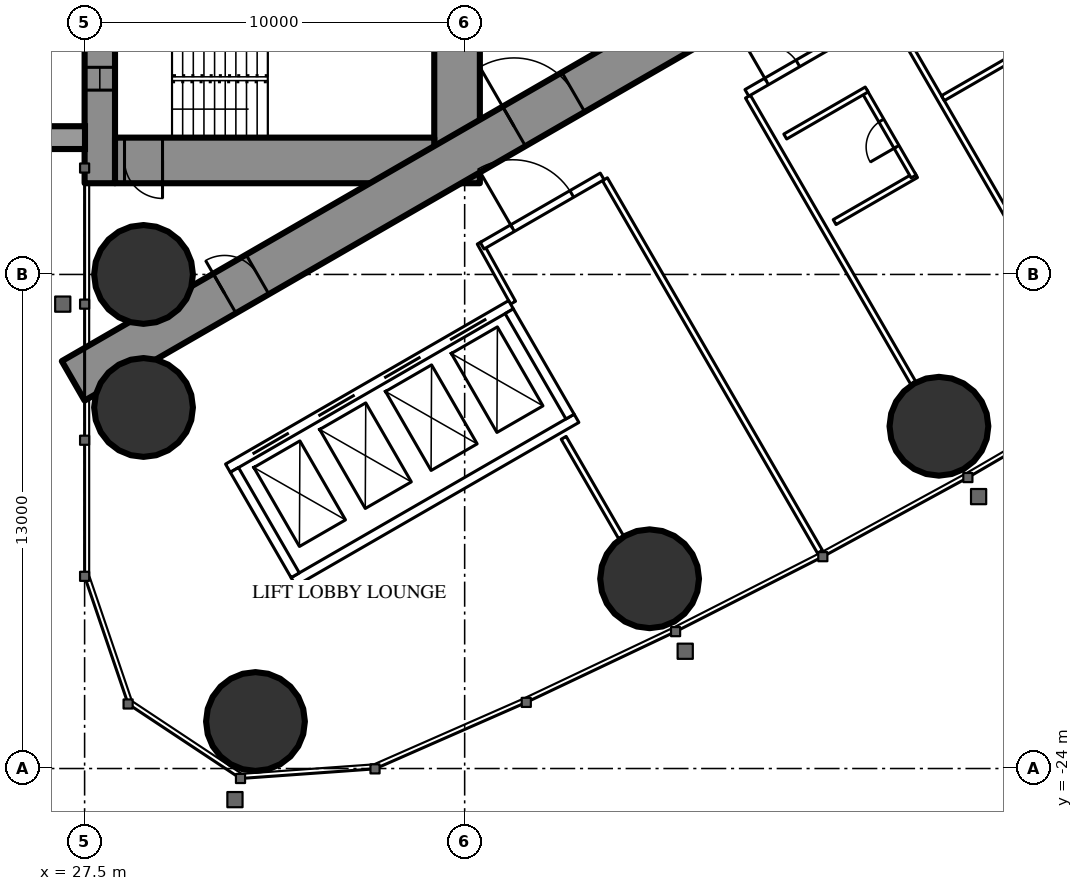
"""IFC4 building model, lengths in metres.
Left out: names, types, materials, properties, quantities, classifications, styles, units other than length and angle.
Written with IfcOpenShell. Run it as: python <this file> out.ifc"""

import sys

from ifc_helpers import new_model, si_unit, direction, frame, frame_2d, origin, origin_2d, place, context, subcontext, project, spatial, rectangle, hollow_circle, extrude, element, fill, save


model = new_model("IFC4")
c1 = context("Model", 3, precision=1e-05, world=origin(), true_north=direction((0.0, 1.0)))
c2 = subcontext(c1, "Body", "Model", "MODEL_VIEW")
j1 = project(units=[si_unit("LENGTHUNIT", "METRE"), si_unit("PLANEANGLEUNIT", "RADIAN")], contexts=[c1])
p1 = place(None, origin())
s1 = spatial("IfcSite", under=j1, at=p1, CompositionType="ELEMENT")
p2 = place(p1, origin())
s2 = spatial("IfcBuilding", under=s1, at=p2, CompositionType="ELEMENT")
p3 = place(p2, frame((0.0, 0.0, 122.1)))
s3 = spatial("IfcBuildingStorey", under=s2, at=p3, CompositionType="ELEMENT", Elevation=122.1)
for number, where, z_axis, x_axis in (
    (1, (31.996, -22.763, 0.0), (0.0, 0.0, 1.0), (1.0, 0.0, 0.0)),
    (2, (29.05, -11.0, 0.0), (0.0, 0.0, 1.0), (1.0, 0.0, 0.0)),
    (3, (29.05, -14.5, 0.0), (0.0, 0.0, 1.0), (1.0, 0.0, 0.0)),
    (4, (42.366, -19.007, 0.0), (0.0, 0.0, 1.0), (1.0, 0.0, 0.0)),
    (5, (49.979, -14.994, 0.0), (0.0, 0.0, 1.0), (1.0, 0.0, 0.0)),
):
    element("IfcColumn", number, at=place(p3, frame(where, z_axis=z_axis, x_axis=x_axis)), inside=s3, PredefinedType="COLUMN", context=c2, shape_type="SweptSolid", body=[
        extrude(hollow_circle(Radius=1.3, WallThickness=0.1, at=origin_2d()), origin(), (0.0, 0.0, 1.0), 3.5),
    ])
p4 = place(p3, frame((27.9, -8.6, 0.0), z_axis=(0.0, 0.0, 1.0), x_axis=(0.0, 1.0, 0.0)))
e6 = element("IfcWall", 6, at=p4, inside=s3, PredefinedType="SHEAR", context=c2, shape_type="SweptSolid", body=[
    extrude(rectangle(XDim=17.2, YDim=0.8, at=frame_2d((8.6, 0.0))), origin(), (0.0, 0.0, 1.0), 3.5),
])
p5 = place(p4, frame((2.45, 0.0, 0.6)))
e7 = element("IfcOpeningElement", 7, at=p5, cuts=e6, PredefinedType="OPENING", context=c2, shape_type="SweptSolid", body=[
    extrude(rectangle(XDim=0.6, YDim=2.1, at=frame_2d((0.3, 1.05))), frame((0.0, 0.41, 0.0), z_axis=(0.0, -1.0, 0.0), x_axis=(1.0, 0.0, 0.0)), (0.0, 0.0, 1.0), 0.82),
])
p6 = place(p4, frame((14.15, 0.0, 0.6)))
e8 = element("IfcOpeningElement", 8, at=p6, cuts=e6, PredefinedType="OPENING", context=c2, shape_type="SweptSolid", body=[
    extrude(rectangle(XDim=0.6, YDim=2.1, at=frame_2d((0.3, 1.05))), frame((0.0, 0.41, 0.0), z_axis=(0.0, -1.0, 0.0), x_axis=(1.0, 0.0, 0.0)), (0.0, 0.0, 1.0), 0.82),
])
p7 = place(p3, frame((37.3, -8.6, 0.0), z_axis=(0.0, 0.0, 1.0), x_axis=(0.0, 1.0, 0.0)))
e9 = element("IfcWall", 9, at=p7, inside=s3, PredefinedType="SHEAR", context=c2, shape_type="SweptSolid", body=[
    extrude(rectangle(XDim=17.2, YDim=1.2, at=frame_2d((8.6, 0.0))), origin(), (0.0, 0.0, 1.0), 3.5),
])
p8 = place(p7, frame((7.7, 0.0, 0.0)))
e10 = element("IfcOpeningElement", 10, at=p8, cuts=e9, PredefinedType="OPENING", context=c2, shape_type="SweptSolid", body=[
    extrude(rectangle(XDim=1.8, YDim=2.2, at=frame_2d((0.9, 1.1))), frame((0.0, 0.61, 0.0), z_axis=(0.0, -1.0, 0.0), x_axis=(1.0, 0.0, 0.0)), (0.0, 0.0, 1.0), 1.22),
])
p9 = place(p3, frame((28.3, -8.0, 0.0), z_axis=(0.0, 0.0, 1.0), x_axis=(1.0, 0.0, 0.0)))
e11 = element("IfcWall", 11, at=p9, inside=s3, PredefinedType="SHEAR", context=c2, shape_type="SweptSolid", body=[
    extrude(rectangle(XDim=8.4, YDim=1.2, at=frame_2d((4.2, 0.0))), origin(), (0.0, 0.0, 1.0), 3.5),
])
p10 = place(p9, frame((0.25, 0.0, 0.0)))
e12 = element("IfcOpeningElement", 12, at=p10, cuts=e11, PredefinedType="OPENING", context=c2, shape_type="SweptSolid", body=[
    extrude(rectangle(XDim=1.0, YDim=2.2, at=frame_2d((0.5, 1.1))), frame((0.0, 0.61, 0.0), z_axis=(0.0, -1.0, 0.0), x_axis=(1.0, 0.0, 0.0)), (0.0, 0.0, 1.0), 1.22),
])
p11 = place(p3, frame((27.2, -13.8, 0.0), z_axis=(0.0, 0.0, 1.0), x_axis=(0.866027159892, 0.499996958321, 0.0)))
e13 = element("IfcWall", 13, at=p11, inside=s3, PredefinedType="SHEAR", context=c2, shape_type="SweptSolid", body=[
    extrude(rectangle(XDim=27.947, YDim=1.2, at=frame_2d((13.973, 0.0))), origin(), (0.0, 0.0, 1.0), 3.5),
])
p12 = place(p11, frame((4.6, 0.0, 0.0)))
e14 = element("IfcOpeningElement", 14, at=p12, cuts=e13, PredefinedType="OPENING", context=c2, shape_type="SweptSolid", body=[
    extrude(rectangle(XDim=1.0, YDim=2.2, at=frame_2d((0.5, 1.1))), frame((0.0, 0.61, 0.0), z_axis=(0.0, -1.0, 0.0), x_axis=(1.0, 0.0, 0.0)), (0.0, 0.0, 1.0), 1.22),
])
p13 = place(p11, frame((13.395, 0.0, 0.0)))
e15 = element("IfcOpeningElement", 15, at=p13, cuts=e13, PredefinedType="OPENING", context=c2, shape_type="SweptSolid", body=[
    extrude(rectangle(XDim=1.8, YDim=2.2, at=frame_2d((0.9, 1.1))), frame((0.0, 0.61, 0.0), z_axis=(0.0, -1.0, 0.0), x_axis=(1.0, 0.0, 0.0)), (0.0, 0.0, 1.0), 1.22),
])
p14 = place(p3, frame((41.19, -8.494, 0.0), z_axis=(0.0, 0.0, 1.0), x_axis=(0.49999258054, -0.866029687369, 0.0)))
e16 = element("IfcWall", 16, at=p14, inside=s3, PredefinedType="PARTITIONING", context=c2, shape_type="SweptSolid", body=[
    extrude(rectangle(XDim=11.318, YDim=0.15, at=frame_2d((5.659, 0.0))), origin(), (0.0, 0.0, 1.0), 3.25),
])
p15 = place(p3, frame((44.954, -6.321, 0.0), z_axis=(0.0, 0.0, 1.0), x_axis=(0.500018676722, -0.866014620505, 0.0)))
e17 = element("IfcWall", 17, at=p15, inside=s3, PredefinedType="PARTITIONING", context=c2, shape_type="SweptSolid", body=[
    extrude(rectangle(XDim=8.704, YDim=0.15, at=frame_2d((4.352, 0.0))), origin(), (0.0, 0.0, 1.0), 2.2),
])
p16 = place(p3, frame((48.719, -4.147, 0.0), z_axis=(0.0, 0.0, 1.0), x_axis=(0.499990498062, -0.866030889661, 0.0)))
e18 = element("IfcWall", 18, at=p16, inside=s3, PredefinedType="PARTITIONING", context=c2, shape_type="SweptSolid", body=[
    extrude(rectangle(XDim=11.406, YDim=0.15, at=frame_2d((5.703, 0.0))), origin(), (0.0, 0.0, 1.0), 3.25),
])
p17 = place(p3, frame((40.105, -15.299, 0.0), z_axis=(0.0, 0.0, 1.0), x_axis=(0.499978822259, -0.866037630414, 0.0)))
e19 = element("IfcWall", 19, at=p17, inside=s3, PredefinedType="PARTITIONING", context=c2, shape_type="SweptSolid", body=[
    extrude(rectangle(XDim=3.023, YDim=0.15, at=frame_2d((1.511, 0.0))), origin(), (0.0, 0.0, 1.0), 3.25),
])
p18 = place(p3, frame((38.773, -11.742, 0.0), z_axis=(0.0, 0.0, 1.0), x_axis=(-0.485528096672, 0.8742210632, 0.0)))
e20 = element("IfcWall", 20, at=p18, inside=s3, PredefinedType="PARTITIONING", context=c2, shape_type="SweptSolid", body=[
    extrude(rectangle(XDim=1.805, YDim=0.15, at=frame_2d((0.903, 0.0))), origin(), (0.0, 0.0, 1.0), 3.25),
])
p19 = place(p3, frame((37.96, -10.243, 0.0), z_axis=(0.0, 0.0, 1.0), x_axis=(0.866042886279, 0.499969718208, 0.0)))
e21 = element("IfcWall", 21, at=p19, inside=s3, PredefinedType="PARTITIONING", context=c2, shape_type="SweptSolid", body=[
    extrude(rectangle(XDim=3.647, YDim=0.2, at=frame_2d((1.823, 0.0))), origin(), (0.0, 0.0, 1.0), 3.25),
])
p20 = place(p19, frame((0.923, 0.0, 0.0)))
e22 = element("IfcOpeningElement", 22, at=p20, cuts=e21, PredefinedType="OPENING", context=c2, shape_type="SweptSolid", body=[
    extrude(rectangle(XDim=1.8, YDim=2.2, at=frame_2d((0.9, 1.1))), frame((0.0, 0.11, 0.0), z_axis=(0.0, -1.0, 0.0), x_axis=(1.0, 0.0, 0.0)), (0.0, 0.0, 1.0), 0.22),
])
p21 = place(p3, frame((44.925, -6.222, 0.0), z_axis=(0.0, 0.0, 1.0), x_axis=(0.866020269055, 0.500008893506, 0.0)))
e23 = element("IfcWall", 23, at=p21, inside=s3, PredefinedType="PARTITIONING", context=c2, shape_type="SweptSolid", body=[
    extrude(rectangle(XDim=12.444, YDim=0.2, at=frame_2d((6.222, 0.0))), origin(), (0.0, 0.0, 1.0), 3.25),
])
p22 = place(p21, frame((0.6, 0.0, 0.0)))
e24 = element("IfcOpeningElement", 24, at=p22, cuts=e23, PredefinedType="OPENING", context=c2, shape_type="SweptSolid", body=[
    extrude(rectangle(XDim=0.95, YDim=2.2, at=frame_2d((0.475, 1.1))), frame((0.0, 0.11, 0.0), z_axis=(0.0, -1.0, 0.0), x_axis=(1.0, 0.0, 0.0)), (0.0, 0.0, 1.0), 0.22),
])
p23 = place(p21, frame((7.047, 0.0, 0.0)))
e25 = element("IfcOpeningElement", 25, at=p23, cuts=e23, PredefinedType="OPENING", context=c2, shape_type="SweptSolid", body=[
    extrude(rectangle(XDim=0.95, YDim=2.2, at=frame_2d((0.475, 1.1))), frame((0.0, 0.11, 0.0), z_axis=(0.0, -1.0, 0.0), x_axis=(1.0, 0.0, 0.0)), (0.0, 0.0, 1.0), 0.22),
])
p24 = place(p3, frame((47.235, -9.623, 0.0), z_axis=(0.0, 0.0, 1.0), x_axis=(0.866006523861, 0.500032699561, 0.0)))
e26 = element("IfcWall", 26, at=p24, inside=s3, PredefinedType="PARTITIONING", context=c2, shape_type="SweptSolid", body=[
    extrude(rectangle(XDim=2.475, YDim=0.15, at=frame_2d((1.237, 0.0))), origin(), (0.0, 0.0, 1.0), 3.25),
])
p25 = place(p3, frame((48.013, -6.171, 0.0), z_axis=(0.0, 0.0, 1.0), x_axis=(0.500006934395, -0.866021400173, 0.0)))
e27 = element("IfcWall", 27, at=p25, inside=s3, PredefinedType="PARTITIONING", context=c2, shape_type="SweptSolid", body=[
    extrude(rectangle(XDim=2.6, YDim=0.15, at=frame_2d((1.3, 0.0))), origin(), (0.0, 0.0, 1.0), 3.25),
])
p26 = place(p25, frame((0.9, 0.0, 0.0)))
e28 = element("IfcOpeningElement", 28, at=p26, cuts=e27, PredefinedType="OPENING", context=c2, shape_type="SweptSolid", body=[
    extrude(rectangle(XDim=0.8, YDim=2.2, at=frame_2d((0.4, 1.1))), frame((0.0, 0.085, 0.0), z_axis=(0.0, -1.0, 0.0), x_axis=(1.0, 0.0, 0.0)), (0.0, 0.0, 1.0), 0.17),
])
p27 = place(p3, frame((45.935, -7.371, 0.0), z_axis=(0.0, 0.0, 1.0), x_axis=(0.866031185235, 0.4999899861, 0.0)))
e29 = element("IfcWall", 29, at=p27, inside=s3, PredefinedType="PARTITIONING", context=c2, shape_type="SweptSolid", body=[
    extrude(rectangle(XDim=2.475, YDim=0.15, at=frame_2d((1.238, 0.0))), origin(), (0.0, 0.0, 1.0), 3.25),
])
p28 = place(p3, frame((50.083, -6.362, 0.0), z_axis=(0.0, 0.0, 1.0), x_axis=(0.866006523861, 0.500032699561, 0.0)))
e30 = element("IfcWall", 30, at=p28, inside=s3, PredefinedType="PARTITIONING", context=c2, shape_type="SweptSolid", body=[
    extrude(rectangle(XDim=2.475, YDim=0.15, at=frame_2d((1.237, 0.0))), origin(), (0.0, 0.0, 1.0), 3.25),
])
p29 = place(p3, frame((50.862, -2.91, 0.0), z_axis=(0.0, 0.0, 1.0), x_axis=(0.500047596559, -0.865997922154, 0.0)))
e31 = element("IfcWall", 31, at=p29, inside=s3, PredefinedType="PARTITIONING", context=c2, shape_type="SweptSolid", body=[
    extrude(rectangle(XDim=2.6, YDim=0.15, at=frame_2d((1.3, 0.0))), origin(), (0.0, 0.0, 1.0), 3.25),
])
p30 = place(p29, frame((0.9, 0.0, 0.0)))
e32 = element("IfcOpeningElement", 32, at=p30, cuts=e31, PredefinedType="OPENING", context=c2, shape_type="SweptSolid", body=[
    extrude(rectangle(XDim=0.8, YDim=2.2, at=frame_2d((0.4, 1.1))), frame((0.0, 0.085, 0.0), z_axis=(0.0, -1.0, 0.0), x_axis=(1.0, 0.0, 0.0)), (0.0, 0.0, 1.0), 0.17),
])
p31 = place(p3, frame((31.271, -16.097, 0.0), z_axis=(0.0, 0.0, 1.0), x_axis=(0.86604045752, 0.499973925258, 0.0)))
e33 = element("IfcWall", 33, at=p31, inside=s3, PredefinedType="PARTITIONING", context=c2, shape_type="SweptSolid", body=[
    extrude(rectangle(XDim=8.6, YDim=0.25, at=frame_2d((4.3, 0.0))), origin(), (0.0, 0.0, 1.0), 3.25),
])
p32 = place(p31, frame((0.75, 0.0, 0.0)))
e34 = element("IfcOpeningElement", 34, at=p32, cuts=e33, PredefinedType="OPENING", context=c2, shape_type="SweptSolid", body=[
    extrude(rectangle(XDim=1.1, YDim=2.2, at=frame_2d((0.55, 1.1))), frame((0.0, 0.135, 0.0), z_axis=(0.0, -1.0, 0.0), x_axis=(1.0, 0.0, 0.0)), (0.0, 0.0, 1.0), 0.27),
])
p33 = place(p31, frame((2.75, 0.0, 0.0)))
e35 = element("IfcOpeningElement", 35, at=p33, cuts=e33, PredefinedType="OPENING", context=c2, shape_type="SweptSolid", body=[
    extrude(rectangle(XDim=1.1, YDim=2.2, at=frame_2d((0.55, 1.1))), frame((0.0, 0.135, 0.0), z_axis=(0.0, -1.0, 0.0), x_axis=(1.0, 0.0, 0.0)), (0.0, 0.0, 1.0), 0.27),
])
p34 = place(p31, frame((4.75, 0.0, 0.0)))
e36 = element("IfcOpeningElement", 36, at=p34, cuts=e33, PredefinedType="OPENING", context=c2, shape_type="SweptSolid", body=[
    extrude(rectangle(XDim=1.1, YDim=2.2, at=frame_2d((0.55, 1.1))), frame((0.0, 0.135, 0.0), z_axis=(0.0, -1.0, 0.0), x_axis=(1.0, 0.0, 0.0)), (0.0, 0.0, 1.0), 0.27),
])
p35 = place(p31, frame((6.75, 0.0, 0.0)))
e37 = element("IfcOpeningElement", 37, at=p35, cuts=e33, PredefinedType="OPENING", context=c2, shape_type="SweptSolid", body=[
    extrude(rectangle(XDim=1.1, YDim=2.2, at=frame_2d((0.55, 1.1))), frame((0.0, 0.135, 0.0), z_axis=(0.0, -1.0, 0.0), x_axis=(1.0, 0.0, 0.0)), (0.0, 0.0, 1.0), 0.27),
])
p36 = place(p3, frame((32.996, -19.086, 0.0), z_axis=(0.0, 0.0, 1.0), x_axis=(0.866028165386, 0.499995216735, 0.0)))
e38 = element("IfcWall", 38, at=p36, inside=s3, PredefinedType="PARTITIONING", context=c2, shape_type="SweptSolid", body=[
    extrude(rectangle(XDim=8.6, YDim=0.25, at=frame_2d((4.3, 0.0))), origin(), (0.0, 0.0, 1.0), 3.25),
])
for number, where, z_axis, x_axis in (
    (39, (31.441, -16.143, 0.0), (0.0, 0.0, 1.0), (0.5, -0.866, 0.0)),
    (40, (38.673, -11.968, 0.0), (0.0, 0.0, 1.0), (0.5, -0.866, 0.0)),
):
    element("IfcWall", number, at=place(p3, frame(where, z_axis=z_axis, x_axis=x_axis)), inside=s3, PredefinedType="PARTITIONING", context=c2, shape_type="SweptSolid", body=[
        extrude(rectangle(XDim=3.201, YDim=0.25, at=frame_2d((1.6, 0.0))), origin(), (0.0, 0.0, 1.0), 3.25),
    ])
p37 = place(p26, origin())
e41 = element("IfcDoor", 41, at=p37, inside=s3, OperationType="SINGLE_SWING_RIGHT", PredefinedType="DOOR", context=c2, shape_type="SweptSolid", body=[
    extrude(rectangle(XDim=0.8, YDim=2.2, at=frame_2d((0.4, 1.1))), frame((0.0, 0.025, 0.0), z_axis=(0.0, -1.0, 0.0), x_axis=(1.0, 0.0, 0.0)), (0.0, 0.0, 1.0), 0.05),
])
fill(e28, e41)
p38 = place(p22, origin())
e42 = element("IfcDoor", 42, at=p38, inside=s3, OperationType="SINGLE_SWING_LEFT", PredefinedType="DOOR", context=c2, shape_type="SweptSolid", body=[
    extrude(rectangle(XDim=0.95, YDim=2.2, at=frame_2d((0.475, 1.1))), frame((0.0, 0.025, 0.0), z_axis=(0.0, -1.0, 0.0), x_axis=(1.0, 0.0, 0.0)), (0.0, 0.0, 1.0), 0.05),
])
fill(e24, e42)
p39 = place(p20, origin())
e43 = element("IfcDoor", 43, at=p39, inside=s3, OperationType="DOUBLE_DOOR_SINGLE_SWING", PredefinedType="DOOR", context=c2, shape_type="SweptSolid", body=[
    extrude(rectangle(XDim=1.8, YDim=2.2, at=frame_2d((0.9, 1.1))), frame((0.0, 0.025, 0.0), z_axis=(0.0, -1.0, 0.0), x_axis=(1.0, 0.0, 0.0)), (0.0, 0.0, 1.0), 0.05),
])
fill(e22, e43)
p40 = place(p12, origin())
e44 = element("IfcDoor", 44, at=p40, inside=s3, OperationType="SINGLE_SWING_LEFT", PredefinedType="DOOR", context=c2, shape_type="SweptSolid", body=[
    extrude(rectangle(XDim=1.0, YDim=2.2, at=frame_2d((0.5, 1.1))), frame((0.0, 0.025, 0.0), z_axis=(0.0, -1.0, 0.0), x_axis=(1.0, 0.0, 0.0)), (0.0, 0.0, 1.0), 0.05),
])
fill(e14, e44)
p41 = place(p13, origin())
e45 = element("IfcDoor", 45, at=p41, inside=s3, OperationType="DOUBLE_DOOR_SINGLE_SWING", PredefinedType="DOOR", context=c2, shape_type="SweptSolid", body=[
    extrude(rectangle(XDim=1.8, YDim=2.2, at=frame_2d((0.9, 1.1))), frame((0.0, 0.025, 0.0), z_axis=(0.0, -1.0, 0.0), x_axis=(1.0, 0.0, 0.0)), (0.0, 0.0, 1.0), 0.05),
])
fill(e15, e45)
p42 = place(p10, origin())
e46 = element("IfcDoor", 46, at=p42, inside=s3, OperationType="SINGLE_SWING_RIGHT", PredefinedType="DOOR", context=c2, shape_type="SweptSolid", body=[
    extrude(rectangle(XDim=1.0, YDim=2.2, at=frame_2d((0.5, 1.1))), frame((0.0, 0.025, 0.0), z_axis=(0.0, -1.0, 0.0), x_axis=(1.0, 0.0, 0.0)), (0.0, 0.0, 1.0), 0.05),
])
fill(e12, e46)
p43 = place(p32, origin())
e47 = element("IfcDoor", 47, at=p43, inside=s3, OperationType="DOUBLE_DOOR_SLIDING", PredefinedType="USERDEFINED", context=c2, shape_type="SweptSolid", body=[
    extrude(rectangle(XDim=1.1, YDim=2.2, at=frame_2d((0.55, 1.1))), frame((0.0, 0.025, 0.0), z_axis=(0.0, -1.0, 0.0), x_axis=(1.0, 0.0, 0.0)), (0.0, 0.0, 1.0), 0.05),
])
fill(e34, e47)
p44 = place(p33, origin())
e48 = element("IfcDoor", 48, at=p44, inside=s3, OperationType="DOUBLE_DOOR_SLIDING", PredefinedType="USERDEFINED", context=c2, shape_type="SweptSolid", body=[
    extrude(rectangle(XDim=1.1, YDim=2.2, at=frame_2d((0.55, 1.1))), frame((0.0, 0.025, 0.0), z_axis=(0.0, -1.0, 0.0), x_axis=(1.0, 0.0, 0.0)), (0.0, 0.0, 1.0), 0.05),
])
fill(e35, e48)
p45 = place(p34, origin())
e49 = element("IfcDoor", 49, at=p45, inside=s3, OperationType="DOUBLE_DOOR_SLIDING", PredefinedType="USERDEFINED", context=c2, shape_type="SweptSolid", body=[
    extrude(rectangle(XDim=1.1, YDim=2.2, at=frame_2d((0.55, 1.1))), frame((0.0, 0.025, 0.0), z_axis=(0.0, -1.0, 0.0), x_axis=(1.0, 0.0, 0.0)), (0.0, 0.0, 1.0), 0.05),
])
fill(e36, e49)
p46 = place(p35, origin())
e50 = element("IfcDoor", 50, at=p46, inside=s3, OperationType="DOUBLE_DOOR_SLIDING", PredefinedType="USERDEFINED", context=c2, shape_type="SweptSolid", body=[
    extrude(rectangle(XDim=1.1, YDim=2.2, at=frame_2d((0.55, 1.1))), frame((0.0, 0.025, 0.0), z_axis=(0.0, -1.0, 0.0), x_axis=(1.0, 0.0, 0.0)), (0.0, 0.0, 1.0), 0.05),
])
fill(e37, e50)
p47 = place(p5, origin())
e51 = element("IfcWindow", 51, at=p47, inside=s3, PartitioningType="SINGLE_PANEL", PredefinedType="WINDOW", context=c2, shape_type="SweptSolid", body=[
    extrude(rectangle(XDim=0.6, YDim=2.1, at=frame_2d((0.3, 1.05))), frame((0.0, 0.03, 0.0), z_axis=(0.0, -1.0, 0.0), x_axis=(1.0, 0.0, 0.0)), (0.0, 0.0, 1.0), 0.06),
])
fill(e7, e51)
save(model, sys.argv[1])
